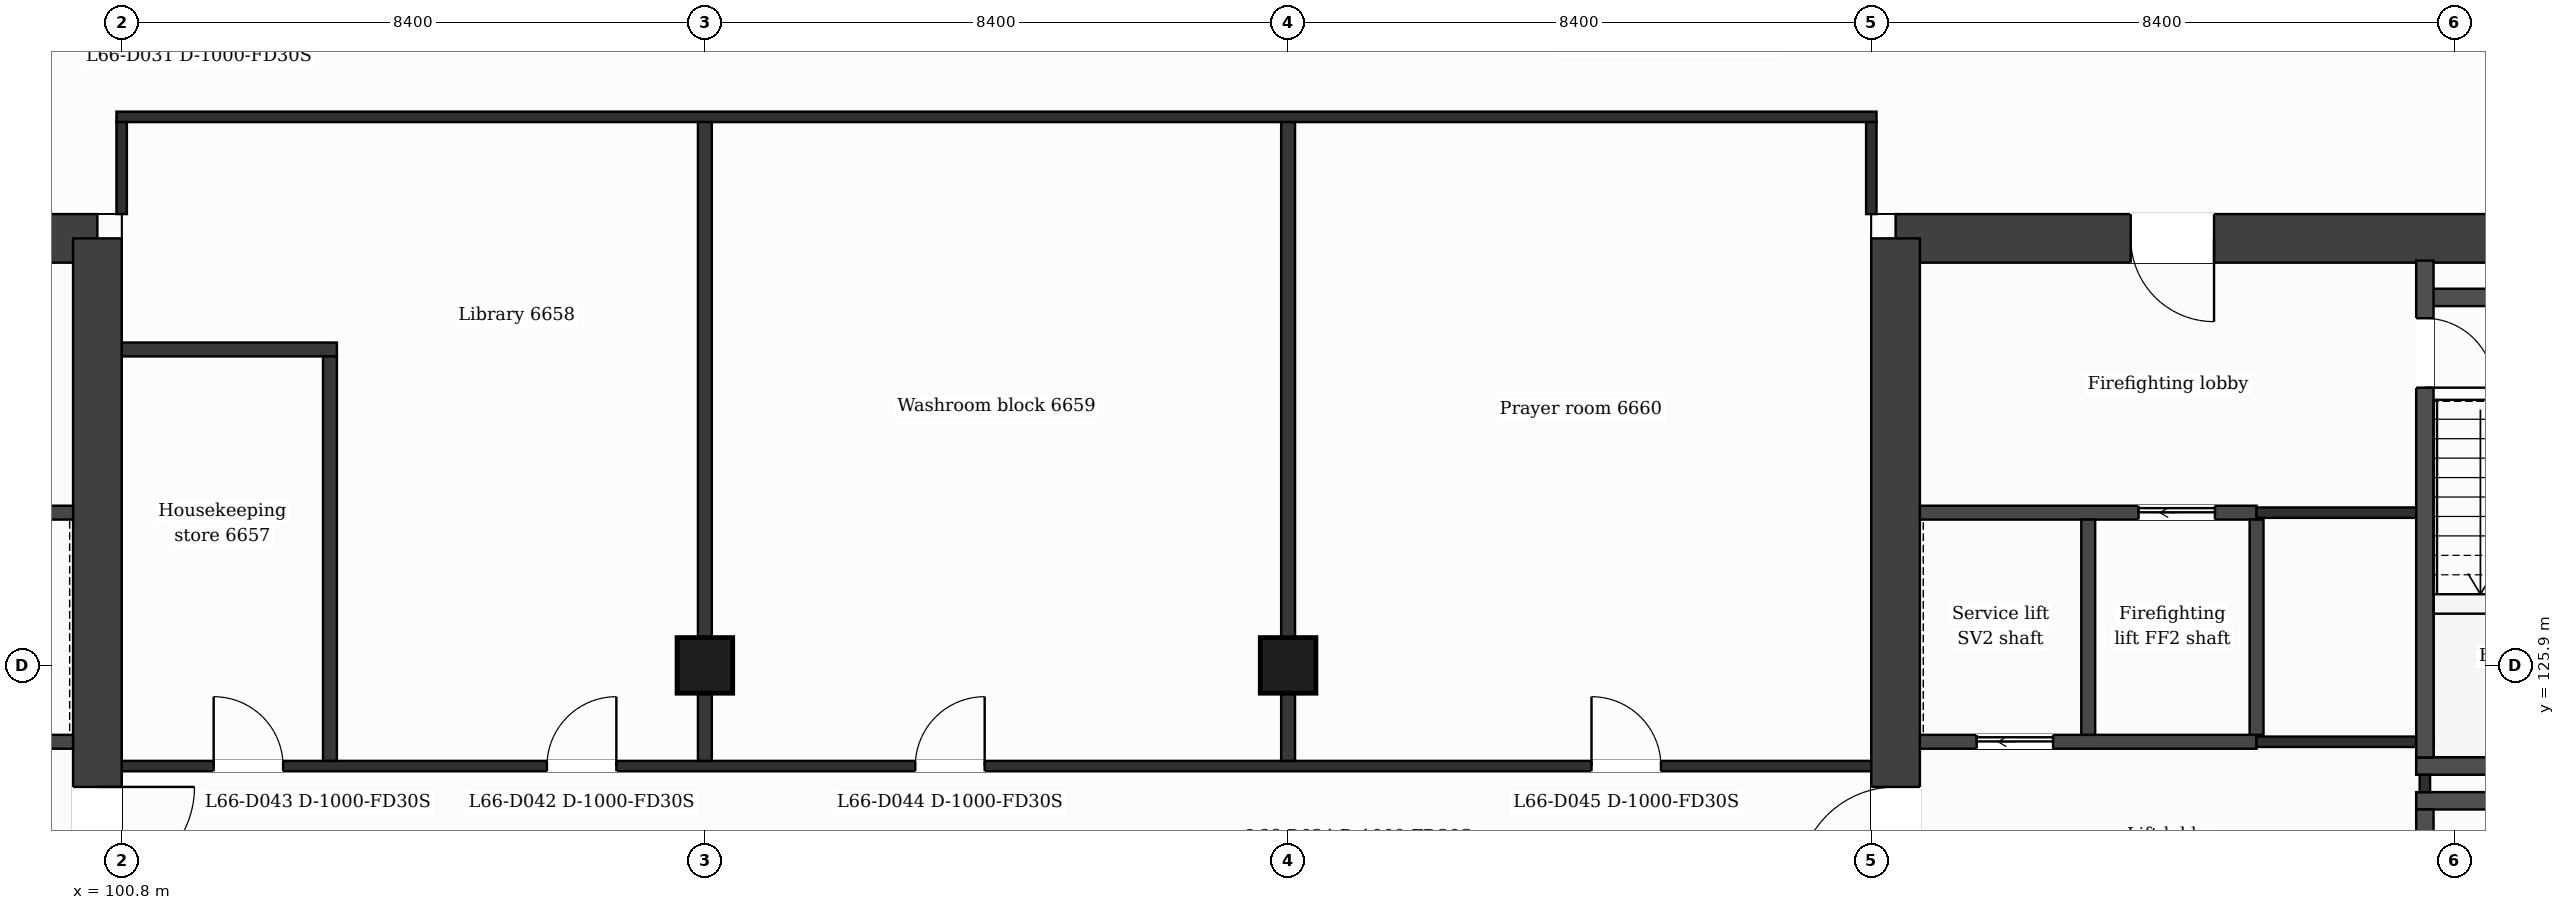
"""IFC4 building model, lengths in metres.
Left out: names, types, materials, properties, quantities, classifications, styles, units other than length and angle.
Written with IfcOpenShell. Run it as: python <this file> out.ifc"""

import sys

from ifc_helpers import new_model, si_unit, direction, frame, frame_2d, origin, origin_2d, place, context, subcontext, project, spatial, rectangle, extrude, element, fill, save


model = new_model("IFC4")
c1 = context("Model", 3, precision=1e-05, world=origin(), true_north=direction((0.0, 1.0)))
c2 = subcontext(c1, "Body", "Model", "MODEL_VIEW")
j1 = project(units=[si_unit("LENGTHUNIT", "METRE"), si_unit("PLANEANGLEUNIT", "RADIAN")], contexts=[c1])
p1 = place(None, origin())
s1 = spatial("IfcSite", under=j1, at=p1, CompositionType="ELEMENT")
p2 = place(p1, origin())
s2 = spatial("IfcBuilding", under=s1, at=p2, CompositionType="ELEMENT")
p3 = place(p2, frame((0.0, 0.0, 273.8)))
s3 = spatial("IfcBuildingStorey", under=s2, at=p3, CompositionType="ELEMENT", Elevation=273.8)
p4 = place(p3, frame((88.937, 132.05, 0.0), z_axis=(0.0, 0.0, 1.0), x_axis=(1.0, 0.0, 0.0)))
e1 = element("IfcWall", 1, at=p4, inside=s3, PredefinedType="SHEAR", context=c2, shape_type="SweptSolid", body=[
    extrude(rectangle(XDim=11.513, YDim=0.7, at=frame_2d((5.757, 0.0))), origin(), (0.0, 0.0, 1.0), 3.7),
])
p5 = place(p4, frame((6.927, 0.0, 0.0)))
e2 = element("IfcOpeningElement", 2, at=p5, cuts=e1, PredefinedType="OPENING", context=c2, shape_type="SweptSolid", body=[
    extrude(rectangle(XDim=1.2, YDim=2.1, at=frame_2d((0.6, 1.05))), frame((0.0, 0.36, 0.0), z_axis=(0.0, -1.0, 0.0), x_axis=(1.0, 0.0, 0.0)), (0.0, 0.0, 1.0), 0.72),
])
p6 = place(p3, frame((100.45, 132.05, 0.0), z_axis=(0.0, 0.0, 1.0), x_axis=(0.0, -1.0, 0.0)))
e3 = element("IfcWall", 3, at=p6, inside=s3, PredefinedType="SHEAR", context=c2, shape_type="SweptSolid", body=[
    extrude(rectangle(XDim=21.3, YDim=0.7, at=frame_2d((10.65, 0.0))), origin(), (0.0, 0.0, 1.0), 3.7),
])
p7 = place(p6, frame((7.9, 0.0, 0.0)))
e4 = element("IfcOpeningElement", 4, at=p7, cuts=e3, PredefinedType="OPENING", context=c2, shape_type="SweptSolid", body=[
    extrude(rectangle(XDim=1.4, YDim=2.1, at=frame_2d((0.7, 1.05))), frame((0.0, 0.36, 0.0), z_axis=(0.0, -1.0, 0.0), x_axis=(1.0, 0.0, 0.0)), (0.0, 0.0, 1.0), 0.72),
])
p8 = place(p3, frame((126.35, 132.05, 0.0), z_axis=(0.0, 0.0, 1.0), x_axis=(1.0, 0.0, 0.0)))
e5 = element("IfcWall", 5, at=p8, inside=s3, PredefinedType="SHEAR", context=c2, shape_type="SweptSolid", body=[
    extrude(rectangle(XDim=11.513, YDim=0.7, at=frame_2d((5.757, 0.0))), origin(), (0.0, 0.0, 1.0), 3.7),
])
p9 = place(p8, frame((3.386, 0.0, 0.0)))
e6 = element("IfcOpeningElement", 6, at=p9, cuts=e5, PredefinedType="OPENING", context=c2, shape_type="SweptSolid", body=[
    extrude(rectangle(XDim=1.2, YDim=2.1, at=frame_2d((0.6, 1.05))), frame((0.0, 0.36, 0.0), z_axis=(0.0, -1.0, 0.0), x_axis=(1.0, 0.0, 0.0)), (0.0, 0.0, 1.0), 0.72),
])
p10 = place(p3, frame((126.35, 110.75, 0.0), z_axis=(0.0, 0.0, 1.0), x_axis=(0.0, 1.0, 0.0)))
e7 = element("IfcWall", 7, at=p10, inside=s3, PredefinedType="SHEAR", context=c2, shape_type="SweptSolid", body=[
    extrude(rectangle(XDim=21.3, YDim=0.7, at=frame_2d((10.65, 0.0))), origin(), (0.0, 0.0, 1.0), 3.7),
])
p11 = place(p10, frame((12.0, 0.0, 0.0)))
e8 = element("IfcOpeningElement", 8, at=p11, cuts=e7, PredefinedType="OPENING", context=c2, shape_type="SweptSolid", body=[
    extrude(rectangle(XDim=1.4, YDim=2.1, at=frame_2d((0.7, 1.05))), frame((0.0, 0.36, 0.0), z_axis=(0.0, -1.0, 0.0), x_axis=(1.0, 0.0, 0.0)), (0.0, 0.0, 1.0), 0.72),
])
for number, where, z_axis, x_axis in (
    (9, (109.2, 125.9, 0.0), (0.0, 0.0, 1.0), (1.0, 0.0, 0.0)),
    (10, (117.6, 125.9, 0.0), (0.0, 0.0, 1.0), (1.0, 0.0, 0.0)),
):
    element("IfcColumn", number, at=place(p3, frame(where, z_axis=z_axis, x_axis=x_axis)), inside=s3, PredefinedType="COLUMN", context=c2, shape_type="SweptSolid", body=[
        extrude(rectangle(XDim=0.8, YDim=0.8, at=origin_2d()), origin(), (0.0, 0.0, 1.0), 3.7),
    ])
for number, where, z_axis, x_axis in (
    (11, (133.848, 123.95, 0.0), (0.0, 0.0, 1.0), (1.0, 0.0, 0.0)),
    (12, (133.848, 124.45, 0.0), (0.0, 0.0, 1.0), (1.0, 0.0, 0.0)),
):
    element("IfcWall", number, at=place(p3, frame(where, z_axis=z_axis, x_axis=x_axis)), inside=s3, PredefinedType="PARTITIONING", context=c2, shape_type="SweptSolid", body=[
        extrude(rectangle(XDim=3.4, YDim=0.25, at=frame_2d((1.7, 0.0))), origin(), (0.0, 0.0, 1.0), 3.38),
    ])
p12 = place(p3, frame((100.8, 124.45, 0.0), z_axis=(0.0, 0.0, 1.0), x_axis=(1.0, 0.0, 0.0)))
e13 = element("IfcWall", 13, at=p12, inside=s3, PredefinedType="PARTITIONING", context=c2, shape_type="SweptSolid", body=[
    extrude(rectangle(XDim=25.2, YDim=0.15, at=frame_2d((12.6, 0.0))), origin(), (0.0, 0.0, 1.0), 3.38),
])
p13 = place(p12, frame((6.125, 0.0, 0.0)))
e14 = element("IfcOpeningElement", 14, at=p13, cuts=e13, PredefinedType="OPENING", context=c2, shape_type="SweptSolid", body=[
    extrude(rectangle(XDim=1.0, YDim=2.1, at=frame_2d((0.5, 1.05))), frame((0.0, 0.085, 0.0), z_axis=(0.0, -1.0, 0.0), x_axis=(1.0, 0.0, 0.0)), (0.0, 0.0, 1.0), 0.17),
])
p14 = place(p12, frame((1.325, 0.0, 0.0)))
e15 = element("IfcOpeningElement", 15, at=p14, cuts=e13, PredefinedType="OPENING", context=c2, shape_type="SweptSolid", body=[
    extrude(rectangle(XDim=1.0, YDim=2.1, at=frame_2d((0.5, 1.05))), frame((0.0, 0.085, 0.0), z_axis=(0.0, -1.0, 0.0), x_axis=(1.0, 0.0, 0.0)), (0.0, 0.0, 1.0), 0.17),
])
p15 = place(p12, frame((11.43, 0.0, 0.0)))
e16 = element("IfcOpeningElement", 16, at=p15, cuts=e13, PredefinedType="OPENING", context=c2, shape_type="SweptSolid", body=[
    extrude(rectangle(XDim=1.0, YDim=2.1, at=frame_2d((0.5, 1.05))), frame((0.0, 0.085, 0.0), z_axis=(0.0, -1.0, 0.0), x_axis=(1.0, 0.0, 0.0)), (0.0, 0.0, 1.0), 0.17),
])
p16 = place(p12, frame((21.17, 0.0, 0.0)))
e17 = element("IfcOpeningElement", 17, at=p16, cuts=e13, PredefinedType="OPENING", context=c2, shape_type="SweptSolid", body=[
    extrude(rectangle(XDim=1.0, YDim=2.1, at=frame_2d((0.5, 1.05))), frame((0.0, 0.085, 0.0), z_axis=(0.0, -1.0, 0.0), x_axis=(1.0, 0.0, 0.0)), (0.0, 0.0, 1.0), 0.17),
])
p17 = place(p3, frame((92.702, 124.8, 0.0), z_axis=(0.0, 0.0, 1.0), x_axis=(1.0, 0.0, 0.0)))
e18 = element("IfcWall", 18, at=p17, inside=s3, PredefinedType="PARTITIONING", context=c2, shape_type="SweptSolid", body=[
    extrude(rectangle(XDim=7.398, YDim=0.2, at=frame_2d((3.699, 0.0))), origin(), (0.0, 0.0, 1.0), 3.38),
])
p18 = place(p17, frame((5.636, 0.0, 0.0)))
e19 = element("IfcOpeningElement", 19, at=p18, cuts=e18, PredefinedType="OPENING", context=c2, shape_type="SweptSolid", body=[
    extrude(rectangle(XDim=1.1, YDim=2.1, at=frame_2d((0.55, 1.05))), frame((0.0, 0.11, 0.0), z_axis=(0.0, -1.0, 0.0), x_axis=(1.0, 0.0, 0.0)), (0.0, 0.0, 1.0), 0.22),
])
p19 = place(p3, frame((126.7, 124.8, 0.0), z_axis=(0.0, 0.0, 1.0), x_axis=(1.0, 0.0, 0.0)))
e20 = element("IfcWall", 20, at=p19, inside=s3, PredefinedType="PARTITIONING", context=c2, shape_type="SweptSolid", body=[
    extrude(rectangle(XDim=4.849, YDim=0.2, at=frame_2d((2.424, 0.0))), origin(), (0.0, 0.0, 1.0), 3.38),
])
p20 = place(p19, frame((0.818, 0.0, 0.0)))
e21 = element("IfcOpeningElement", 21, at=p20, cuts=e20, PredefinedType="OPENING", context=c2, shape_type="SweptSolid", body=[
    extrude(rectangle(XDim=1.1, YDim=2.1, at=frame_2d((0.55, 1.05))), frame((0.0, 0.11, 0.0), z_axis=(0.0, -1.0, 0.0), x_axis=(1.0, 0.0, 0.0)), (0.0, 0.0, 1.0), 0.22),
])
p21 = place(p3, frame((131.549, 124.8, 0.0), z_axis=(0.0, 0.0, 1.0), x_axis=(1.0, 0.0, 0.0)))
e22 = element("IfcWall", 22, at=p21, inside=s3, PredefinedType="PARTITIONING", context=c2, shape_type="SweptSolid", body=[
    extrude(rectangle(XDim=2.549, YDim=0.15, at=frame_2d((1.275, 0.0))), origin(), (0.0, 0.0, 1.0), 3.38),
])
p22 = place(p3, frame((92.827, 128.1, 0.0), z_axis=(0.0, 0.0, 1.0), x_axis=(1.0, 0.0, 0.0)))
e23 = element("IfcWall", 23, at=p22, inside=s3, PredefinedType="PARTITIONING", context=c2, shape_type="SweptSolid", body=[
    extrude(rectangle(XDim=7.273, YDim=0.2, at=frame_2d((3.637, 0.0))), origin(), (0.0, 0.0, 1.0), 3.38),
])
p23 = place(p22, frame((2.93, 0.0, 0.0)))
e24 = element("IfcOpeningElement", 24, at=p23, cuts=e23, PredefinedType="OPENING", context=c2, shape_type="SweptSolid", body=[
    extrude(rectangle(XDim=1.1, YDim=2.1, at=frame_2d((0.55, 1.05))), frame((0.0, 0.11, 0.0), z_axis=(0.0, -1.0, 0.0), x_axis=(1.0, 0.0, 0.0)), (0.0, 0.0, 1.0), 0.22),
])
p24 = place(p3, frame((126.7, 128.1, 0.0), z_axis=(0.0, 0.0, 1.0), x_axis=(1.0, 0.0, 0.0)))
e25 = element("IfcWall", 25, at=p24, inside=s3, PredefinedType="PARTITIONING", context=c2, shape_type="SweptSolid", body=[
    extrude(rectangle(XDim=4.849, YDim=0.2, at=frame_2d((2.424, 0.0))), origin(), (0.0, 0.0, 1.0), 3.38),
])
p25 = place(p24, frame((3.149, 0.0, 0.0)))
e26 = element("IfcOpeningElement", 26, at=p25, cuts=e25, PredefinedType="OPENING", context=c2, shape_type="SweptSolid", body=[
    extrude(rectangle(XDim=1.1, YDim=2.1, at=frame_2d((0.55, 1.05))), frame((0.0, 0.11, 0.0), z_axis=(0.0, -1.0, 0.0), x_axis=(1.0, 0.0, 0.0)), (0.0, 0.0, 1.0), 0.22),
])
p26 = place(p3, frame((131.549, 128.1, 0.0), z_axis=(0.0, 0.0, 1.0), x_axis=(1.0, 0.0, 0.0)))
e27 = element("IfcWall", 27, at=p26, inside=s3, PredefinedType="PARTITIONING", context=c2, shape_type="SweptSolid", body=[
    extrude(rectangle(XDim=2.424, YDim=0.15, at=frame_2d((1.212, 0.0))), origin(), (0.0, 0.0, 1.0), 3.38),
])
p27 = place(p3, frame((100.8, 130.45, 0.0), z_axis=(0.0, 0.0, 1.0), x_axis=(1.0, 0.0, 0.0)))
e28 = element("IfcWall", 28, at=p27, inside=s3, PredefinedType="PARTITIONING", context=c2, shape_type="SweptSolid", body=[
    extrude(rectangle(XDim=3.1, YDim=0.2, at=frame_2d((1.55, 0.0))), origin(), (0.0, 0.0, 1.0), 3.38),
])
p28 = place(p3, frame((133.848, 131.2, 0.0), z_axis=(0.0, 0.0, 1.0), x_axis=(1.0, 0.0, 0.0)))
e29 = element("IfcWall", 29, at=p28, inside=s3, PredefinedType="PARTITIONING", context=c2, shape_type="SweptSolid", body=[
    extrude(rectangle(XDim=3.807, YDim=0.25, at=frame_2d((1.903, 0.0))), origin(), (0.0, 0.0, 1.0), 3.38),
])
p29 = place(p3, frame((100.725, 133.8, 0.0), z_axis=(0.0, 0.0, 1.0), x_axis=(1.0, 0.0, 0.0)))
e30 = element("IfcWall", 30, at=p29, inside=s3, PredefinedType="PARTITIONING", context=c2, shape_type="SweptSolid", body=[
    extrude(rectangle(XDim=25.35, YDim=0.15, at=frame_2d((12.675, 0.0))), origin(), (0.0, 0.0, 1.0), 3.38),
])
p30 = place(p3, frame((100.8, 132.4, 0.0), z_axis=(0.0, 0.0, 1.0), x_axis=(0.0, 1.0, 0.0)))
e31 = element("IfcWall", 31, at=p30, inside=s3, PredefinedType="PARTITIONING", context=c2, shape_type="SweptSolid", body=[
    extrude(rectangle(XDim=1.325, YDim=0.15, at=frame_2d((0.663, 0.0))), origin(), (0.0, 0.0, 1.0), 3.38),
])
p31 = place(p3, frame((103.8, 124.525, 0.0), z_axis=(0.0, 0.0, 1.0), x_axis=(0.0, 1.0, 0.0)))
e32 = element("IfcWall", 32, at=p31, inside=s3, PredefinedType="PARTITIONING", context=c2, shape_type="SweptSolid", body=[
    extrude(rectangle(XDim=5.825, YDim=0.2, at=frame_2d((2.913, 0.0))), origin(), (0.0, 0.0, 1.0), 3.38),
])
for number, where, z_axis, x_axis in (
    (33, (109.2, 124.525, 0.0), (0.0, 0.0, 1.0), (0.0, 1.0, 0.0)),
    (34, (117.6, 124.525, 0.0), (0.0, 0.0, 1.0), (0.0, 1.0, 0.0)),
):
    element("IfcWall", number, at=place(p3, frame(where, z_axis=z_axis, x_axis=x_axis)), inside=s3, PredefinedType="PARTITIONING", context=c2, shape_type="SweptSolid", body=[
        extrude(rectangle(XDim=9.2, YDim=0.2, at=frame_2d((4.6, 0.0))), origin(), (0.0, 0.0, 1.0), 3.38),
    ])
p32 = place(p3, frame((126.0, 132.4, 0.0), z_axis=(0.0, 0.0, 1.0), x_axis=(0.0, 1.0, 0.0)))
e35 = element("IfcWall", 35, at=p32, inside=s3, PredefinedType="PARTITIONING", context=c2, shape_type="SweptSolid", body=[
    extrude(rectangle(XDim=1.325, YDim=0.15, at=frame_2d((0.663, 0.0))), origin(), (0.0, 0.0, 1.0), 3.38),
])
for number, where, z_axis, x_axis in (
    (36, (129.124, 124.9, 0.0), (0.0, 0.0, 1.0), (0.0, 1.0, 0.0)),
    (37, (131.549, 124.9, 0.0), (0.0, 0.0, 1.0), (0.0, 1.0, 0.0)),
):
    element("IfcWall", number, at=place(p3, frame(where, z_axis=z_axis, x_axis=x_axis)), inside=s3, PredefinedType="PARTITIONING", context=c2, shape_type="SweptSolid", body=[
        extrude(rectangle(XDim=3.1, YDim=0.2, at=frame_2d((1.55, 0.0))), origin(), (0.0, 0.0, 1.0), 3.38),
    ])
p33 = place(p3, frame((133.973, 124.075, 0.0), z_axis=(0.0, 0.0, 1.0), x_axis=(0.0, 1.0, 0.0)))
e38 = element("IfcWall", 38, at=p33, inside=s3, PredefinedType="PARTITIONING", context=c2, shape_type="SweptSolid", body=[
    extrude(rectangle(XDim=0.25, YDim=0.15, at=frame_2d((0.125, 0.0))), origin(), (0.0, 0.0, 1.0), 3.38),
])
p34 = place(p3, frame((133.973, 116.67, 0.0), z_axis=(0.0, 0.0, 1.0), x_axis=(0.0, 1.0, 0.0)))
e39 = element("IfcWall", 39, at=p34, inside=s3, PredefinedType="PARTITIONING", context=c2, shape_type="SweptSolid", body=[
    extrude(rectangle(XDim=7.155, YDim=0.25, at=frame_2d((3.578, 0.0))), origin(), (0.0, 0.0, 1.0), 3.38),
])
p35 = place(p34, frame((5.855, 0.0, 0.0)))
e40 = element("IfcOpeningElement", 40, at=p35, cuts=e39, PredefinedType="OPENING", context=c2, shape_type="SweptSolid", body=[
    extrude(rectangle(XDim=0.95, YDim=2.1, at=frame_2d((0.475, 1.05))), frame((0.0, 0.135, 0.0), z_axis=(0.0, -1.0, 0.0), x_axis=(1.0, 0.0, 0.0)), (0.0, 0.0, 1.0), 0.27),
])
p36 = place(p3, frame((133.973, 124.575, 0.0), z_axis=(0.0, 0.0, 1.0), x_axis=(0.0, 1.0, 0.0)))
e41 = element("IfcWall", 41, at=p36, inside=s3, PredefinedType="PARTITIONING", context=c2, shape_type="SweptSolid", body=[
    extrude(rectangle(XDim=7.155, YDim=0.25, at=frame_2d((3.578, 0.0))), origin(), (0.0, 0.0, 1.0), 3.38),
])
p37 = place(p36, frame((5.325, 0.0, 0.0)))
e42 = element("IfcOpeningElement", 42, at=p37, cuts=e41, PredefinedType="OPENING", context=c2, shape_type="SweptSolid", body=[
    extrude(rectangle(XDim=1.0, YDim=2.1, at=frame_2d((0.5, 1.05))), frame((0.0, 0.135, 0.0), z_axis=(0.0, -1.0, 0.0), x_axis=(1.0, 0.0, 0.0)), (0.0, 0.0, 1.0), 0.27),
])
p38 = place(p25, origin())
e43 = element("IfcDoor", 43, at=p38, inside=s3, OperationType="SLIDING_TO_LEFT", PredefinedType="DOOR", context=c2, shape_type="SweptSolid", body=[
    extrude(rectangle(XDim=1.1, YDim=2.1, at=frame_2d((0.55, 1.05))), frame((0.0, 0.025, 0.0), z_axis=(0.0, -1.0, 0.0), x_axis=(1.0, 0.0, 0.0)), (0.0, 0.0, 1.0), 0.05),
])
fill(e26, e43)
p39 = place(p20, origin())
e44 = element("IfcDoor", 44, at=p39, inside=s3, OperationType="SLIDING_TO_LEFT", PredefinedType="DOOR", context=c2, shape_type="SweptSolid", body=[
    extrude(rectangle(XDim=1.1, YDim=2.1, at=frame_2d((0.55, 1.05))), frame((0.0, 0.025, 0.0), z_axis=(0.0, -1.0, 0.0), x_axis=(1.0, 0.0, 0.0)), (0.0, 0.0, 1.0), 0.05),
])
fill(e21, e44)
p40 = place(p37, origin())
e45 = element("IfcDoor", 45, at=p40, inside=s3, OperationType="SINGLE_SWING_LEFT", PredefinedType="DOOR", context=c2, shape_type="SweptSolid", body=[
    extrude(rectangle(XDim=1.0, YDim=2.1, at=frame_2d((0.5, 1.05))), frame((0.0, 0.025, 0.0), z_axis=(0.0, -1.0, 0.0), x_axis=(1.0, 0.0, 0.0)), (0.0, 0.0, 1.0), 0.05),
])
fill(e42, e45)
p41 = place(p13, origin())
e46 = element("IfcDoor", 46, at=p41, inside=s3, OperationType="SINGLE_SWING_RIGHT", PredefinedType="DOOR", context=c2, shape_type="SweptSolid", body=[
    extrude(rectangle(XDim=1.0, YDim=2.1, at=frame_2d((0.5, 1.05))), frame((0.0, 0.025, 0.0), z_axis=(0.0, -1.0, 0.0), x_axis=(1.0, 0.0, 0.0)), (0.0, 0.0, 1.0), 0.05),
])
fill(e14, e46)
p42 = place(p14, origin())
e47 = element("IfcDoor", 47, at=p42, inside=s3, OperationType="SINGLE_SWING_LEFT", PredefinedType="DOOR", context=c2, shape_type="SweptSolid", body=[
    extrude(rectangle(XDim=1.0, YDim=2.1, at=frame_2d((0.5, 1.05))), frame((0.0, 0.025, 0.0), z_axis=(0.0, -1.0, 0.0), x_axis=(1.0, 0.0, 0.0)), (0.0, 0.0, 1.0), 0.05),
])
fill(e15, e47)
p43 = place(p15, origin())
e48 = element("IfcDoor", 48, at=p43, inside=s3, OperationType="SINGLE_SWING_RIGHT", PredefinedType="DOOR", context=c2, shape_type="SweptSolid", body=[
    extrude(rectangle(XDim=1.0, YDim=2.1, at=frame_2d((0.5, 1.05))), frame((0.0, 0.025, 0.0), z_axis=(0.0, -1.0, 0.0), x_axis=(1.0, 0.0, 0.0)), (0.0, 0.0, 1.0), 0.05),
])
fill(e16, e48)
p44 = place(p16, origin())
e49 = element("IfcDoor", 49, at=p44, inside=s3, OperationType="SINGLE_SWING_LEFT", PredefinedType="DOOR", context=c2, shape_type="SweptSolid", body=[
    extrude(rectangle(XDim=1.0, YDim=2.1, at=frame_2d((0.5, 1.05))), frame((0.0, 0.025, 0.0), z_axis=(0.0, -1.0, 0.0), x_axis=(1.0, 0.0, 0.0)), (0.0, 0.0, 1.0), 0.05),
])
fill(e17, e49)
p45 = place(p7, origin())
e50 = element("IfcDoor", 50, at=p45, inside=s3, OperationType="SINGLE_SWING_LEFT", PredefinedType="DOOR", context=c2, shape_type="SweptSolid", body=[
    extrude(rectangle(XDim=1.4, YDim=2.1, at=frame_2d((0.7, 1.05))), frame((0.0, 0.025, 0.0), z_axis=(0.0, -1.0, 0.0), x_axis=(1.0, 0.0, 0.0)), (0.0, 0.0, 1.0), 0.05),
])
fill(e4, e50)
p46 = place(p9, origin())
e51 = element("IfcDoor", 51, at=p46, inside=s3, OperationType="SINGLE_SWING_RIGHT", PredefinedType="DOOR", context=c2, shape_type="SweptSolid", body=[
    extrude(rectangle(XDim=1.2, YDim=2.1, at=frame_2d((0.6, 1.05))), frame((0.0, 0.025, 0.0), z_axis=(0.0, -1.0, 0.0), x_axis=(1.0, 0.0, 0.0)), (0.0, 0.0, 1.0), 0.05),
])
fill(e6, e51)
p47 = place(p11, origin())
e52 = element("IfcDoor", 52, at=p47, inside=s3, OperationType="SINGLE_SWING_LEFT", PredefinedType="DOOR", context=c2, shape_type="SweptSolid", body=[
    extrude(rectangle(XDim=1.4, YDim=2.1, at=frame_2d((0.7, 1.05))), frame((0.0, 0.025, 0.0), z_axis=(0.0, -1.0, 0.0), x_axis=(1.0, 0.0, 0.0)), (0.0, 0.0, 1.0), 0.05),
])
fill(e8, e52)
save(model, sys.argv[1])
